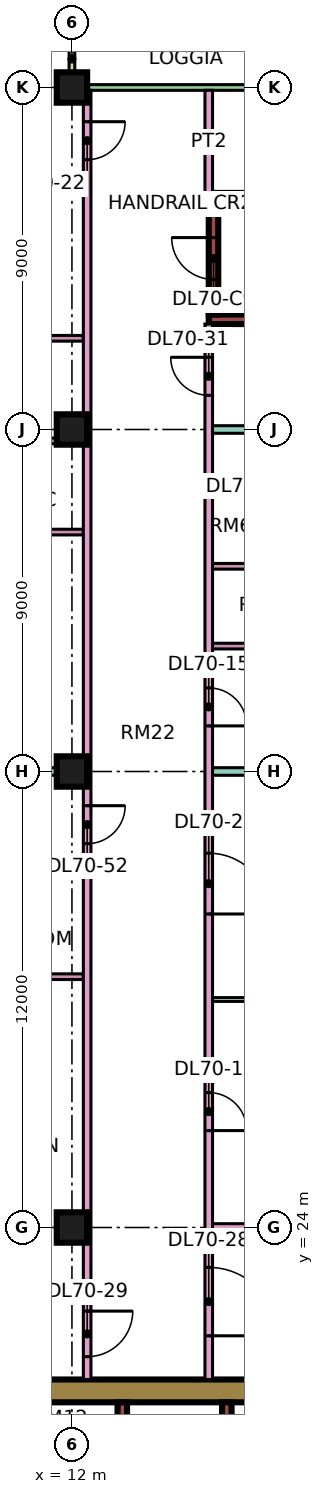
"""IFC4 building model, lengths in metres.
Left out: names, types, materials, properties, quantities, classifications, styles, units other than length and angle.
Written with IfcOpenShell. Run it as: python <this file> out.ifc"""

import sys

from ifc_helpers import new_model, si_unit, direction, frame, frame_2d, origin, origin_2d, place, context, subcontext, project, spatial, rectangle, extrude, element, fill, save


model = new_model("IFC4")
c1 = context("Model", 3, precision=1e-05, world=origin(), true_north=direction((0.0, 1.0)))
c2 = subcontext(c1, "Body", "Model", "MODEL_VIEW")
j1 = project(units=[si_unit("LENGTHUNIT", "METRE"), si_unit("PLANEANGLEUNIT", "RADIAN")], contexts=[c1])
p1 = place(None, origin())
s1 = spatial("IfcSite", under=j1, at=p1, CompositionType="ELEMENT")
p2 = place(p1, origin())
s2 = spatial("IfcBuilding", under=s1, at=p2, CompositionType="ELEMENT")
p3 = place(p2, frame((0.0, 0.0, 299.65)))
s3 = spatial("IfcBuildingStorey", under=s2, at=p3, CompositionType="ELEMENT", Elevation=299.65)
for number, where, z_axis, x_axis in (
    (1, (12.0, 24.0, 0.0), (0.0, 0.0, 1.0), (1.0, 0.0, 0.0)),
    (2, (12.0, 36.0, 0.0), (0.0, 0.0, 1.0), (1.0, 0.0, 0.0)),
    (3, (12.0, 45.0, 0.0), (0.0, 0.0, 1.0), (1.0, 0.0, 0.0)),
    (4, (12.0, 54.0, 0.0), (0.0, 0.0, 1.0), (1.0, 0.0, 0.0)),
):
    element("IfcColumn", number, at=place(p3, frame(where, z_axis=z_axis, x_axis=x_axis)), inside=s3, PredefinedType="COLUMN", context=c2, shape_type="SweptSolid", body=[
        extrude(rectangle(XDim=0.8, YDim=0.8, at=origin_2d()), origin(), (0.0, 0.0, 1.0), 3.75),
    ])
p4 = place(p3, frame((9.0, 19.7, 0.0), z_axis=(0.0, 0.0, 1.0), x_axis=(1.0, 0.0, 0.0)))
e5 = element("IfcWall", 5, at=p4, inside=s3, PredefinedType="SHEAR", context=c2, shape_type="SweptSolid", body=[
    extrude(rectangle(XDim=25.0, YDim=0.6, at=frame_2d((12.5, 0.0))), origin(), (0.0, 0.0, 1.0), 3.75),
])
p5 = place(p4, frame((19.1, 0.0, 0.0)))
e6 = element("IfcOpeningElement", 6, at=p5, cuts=e5, PredefinedType="OPENING", context=c2, shape_type="SweptSolid", body=[
    extrude(rectangle(XDim=1.8, YDim=2.4, at=frame_2d((0.9, 1.2))), frame((0.0, 0.31, 0.0), z_axis=(0.0, -1.0, 0.0), x_axis=(1.0, 0.0, 0.0)), (0.0, 0.0, 1.0), 0.62),
])
p6 = place(p3, frame((13.325, 7.6, 0.0), z_axis=(0.0, 0.0, 1.0), x_axis=(0.0, 1.0, 0.0)))
e7 = element("IfcWall", 7, at=p6, inside=s3, PredefinedType="SHEAR", context=c2, shape_type="SweptSolid", body=[
    extrude(rectangle(XDim=11.8, YDim=0.25, at=frame_2d((5.9, 0.0))), origin(), (0.0, 0.0, 1.0), 3.75),
])
p7 = place(p3, frame((16.075, 15.8, 0.0), z_axis=(0.0, 0.0, 1.0), x_axis=(0.0, 1.0, 0.0)))
e8 = element("IfcWall", 8, at=p7, inside=s3, PredefinedType="SHEAR", context=c2, shape_type="SweptSolid", body=[
    extrude(rectangle(XDim=3.6, YDim=0.25, at=frame_2d((1.8, 0.0))), origin(), (0.0, 0.0, 1.0), 3.75),
])
for number, where, z_axis, x_axis in (
    (9, (15.6, 47.9, 0.0), (0.0, 0.0, 1.0), (1.0, 0.0, 0.0)),
    (10, (15.6, 51.1, 0.0), (0.0, 0.0, 1.0), (1.0, 0.0, 0.0)),
):
    element("IfcWall", number, at=place(p3, frame(where, z_axis=z_axis, x_axis=x_axis)), inside=s3, PredefinedType="SHEAR", context=c2, shape_type="SweptSolid", body=[
        extrude(rectangle(XDim=7.0, YDim=0.25, at=frame_2d((3.5, 0.0))), origin(), (0.0, 0.0, 1.0), 3.75),
    ])
p8 = place(p3, frame((15.725, 48.025, 0.0), z_axis=(0.0, 0.0, 1.0), x_axis=(0.0, 1.0, 0.0)))
e11 = element("IfcWall", 11, at=p8, inside=s3, PredefinedType="SHEAR", context=c2, shape_type="SweptSolid", body=[
    extrude(rectangle(XDim=2.95, YDim=0.25, at=frame_2d((1.475, 0.0))), origin(), (0.0, 0.0, 1.0), 3.75),
])
p9 = place(p8, frame((0.925, 0.0, 0.0)))
e12 = element("IfcOpeningElement", 12, at=p9, cuts=e11, PredefinedType="OPENING", context=c2, shape_type="SweptSolid", body=[
    extrude(rectangle(XDim=1.1, YDim=2.2, at=frame_2d((0.55, 1.1))), frame((0.0, 0.135, 0.0), z_axis=(0.0, -1.0, 0.0), x_axis=(1.0, 0.0, 0.0)), (0.0, 0.0, 1.0), 0.27),
])
p10 = place(p3, frame((22.425, 54.0, 0.0), z_axis=(0.0, 0.0, 1.0), x_axis=(-1.0, 0.0, 0.0)))
e13 = element("IfcWall", 13, at=p10, inside=s3, PredefinedType="SOLIDWALL", context=c2, shape_type="SweptSolid", body=[
    extrude(rectangle(XDim=10.35, YDim=0.15, at=frame_2d((5.175, 0.0))), origin(), (0.0, 0.0, 1.0), 3.35),
])
p11 = place(p10, frame((1.012, 0.0, 0.45)))
e14 = element("IfcOpeningElement", 14, at=p11, cuts=e13, PredefinedType="OPENING", context=c2, shape_type="SweptSolid", body=[
    extrude(rectangle(XDim=4.8, YDim=2.4, at=frame_2d((2.4, 1.2))), frame((0.0, 0.085, 0.0), z_axis=(0.0, -1.0, 0.0), x_axis=(1.0, 0.0, 0.0)), (0.0, 0.0, 1.0), 0.17),
])
p12 = place(p3, frame((12.0, 55.5, 0.0), z_axis=(0.0, 0.0, 1.0), x_axis=(0.0, -1.0, 0.0)))
e15 = element("IfcWall", 15, at=p12, inside=s3, PredefinedType="SOLIDWALL", context=c2, shape_type="SweptSolid", body=[
    extrude(rectangle(XDim=1.5, YDim=0.15, at=frame_2d((0.75, 0.0))), origin(), (0.0, 0.0, 1.0), 3.35),
])
p13 = place(p3, frame((0.0, 36.0, 0.0), z_axis=(0.0, 0.0, 1.0), x_axis=(1.0, 0.0, 0.0)))
e16 = element("IfcWall", 16, at=p13, inside=s3, PredefinedType="PARTITIONING", context=c2, shape_type="SweptSolid", body=[
    extrude(rectangle(XDim=12.3, YDim=0.2, at=frame_2d((6.15, 0.0))), origin(), (0.0, 0.0, 1.0), 3.35),
])
p14 = place(p3, frame((0.074, 22.4, 0.0), z_axis=(0.0, 0.0, 1.0), x_axis=(1.0, 0.0, 0.0)))
e17 = element("IfcWall", 17, at=p14, inside=s3, PredefinedType="PARTITIONING", context=c2, shape_type="SweptSolid", body=[
    extrude(rectangle(XDim=12.226, YDim=0.2, at=frame_2d((6.113, 0.0))), origin(), (0.0, 0.0, 1.0), 3.35),
])
for number, where, z_axis, x_axis in (
    (18, (7.675, 42.3, 0.0), (0.0, 0.0, 1.0), (1.0, 0.0, 0.0)),
    (19, (7.675, 44.7, 0.0), (0.0, 0.0, 1.0), (1.0, 0.0, 0.0)),
    (20, (7.675, 47.4, 0.0), (0.0, 0.0, 1.0), (1.0, 0.0, 0.0)),
    (21, (7.675, 51.3, 0.0), (0.0, 0.0, 1.0), (1.0, 0.0, 0.0)),
):
    element("IfcWall", number, at=place(p3, frame(where, z_axis=z_axis, x_axis=x_axis)), inside=s3, PredefinedType="PARTITIONING", context=c2, shape_type="SweptSolid", body=[
        extrude(rectangle(XDim=4.625, YDim=0.15, at=frame_2d((2.312, 0.0))), origin(), (0.0, 0.0, 1.0), 3.35),
    ])
for number, where, z_axis, x_axis in (
    (22, (8.275, 30.6, 0.0), (0.0, 0.0, 1.0), (1.0, 0.0, 0.0)),
    (23, (8.275, 33.3, 0.0), (0.0, 0.0, 1.0), (1.0, 0.0, 0.0)),
):
    element("IfcWall", number, at=place(p3, frame(where, z_axis=z_axis, x_axis=x_axis)), inside=s3, PredefinedType="PARTITIONING", context=c2, shape_type="SweptSolid", body=[
        extrude(rectangle(XDim=4.025, YDim=0.15, at=frame_2d((2.013, 0.0))), origin(), (0.0, 0.0, 1.0), 3.35),
    ])
p15 = place(p3, frame((12.4, 20.0, 0.0), z_axis=(0.0, 0.0, 1.0), x_axis=(0.0, 1.0, 0.0)))
e24 = element("IfcWall", 24, at=p15, inside=s3, PredefinedType="PARTITIONING", context=c2, shape_type="SweptSolid", body=[
    extrude(rectangle(XDim=33.926, YDim=0.2, at=frame_2d((16.963, 0.0))), origin(), (0.0, 0.0, 1.0), 3.35),
])
p16 = place(p15, frame((32.1, 0.0, 0.0)))
e25 = element("IfcOpeningElement", 25, at=p16, cuts=e24, PredefinedType="OPENING", context=c2, shape_type="SweptSolid", body=[
    extrude(rectangle(XDim=1.0, YDim=2.1, at=frame_2d((0.5, 1.05))), frame((0.0, 0.11, 0.0), z_axis=(0.0, -1.0, 0.0), x_axis=(1.0, 0.0, 0.0)), (0.0, 0.0, 1.0), 0.22),
])
p17 = place(p15, frame((0.6, 0.0, 0.0)))
e26 = element("IfcOpeningElement", 26, at=p17, cuts=e24, PredefinedType="OPENING", context=c2, shape_type="SweptSolid", body=[
    extrude(rectangle(XDim=1.2, YDim=2.1, at=frame_2d((0.6, 1.05))), frame((0.0, 0.11, 0.0), z_axis=(0.0, -1.0, 0.0), x_axis=(1.0, 0.0, 0.0)), (0.0, 0.0, 1.0), 0.22),
])
p18 = place(p15, frame((14.1, 0.0, 0.0)))
e27 = element("IfcOpeningElement", 27, at=p18, cuts=e24, PredefinedType="OPENING", context=c2, shape_type="SweptSolid", body=[
    extrude(rectangle(XDim=1.0, YDim=2.1, at=frame_2d((0.5, 1.05))), frame((0.0, 0.11, 0.0), z_axis=(0.0, -1.0, 0.0), x_axis=(1.0, 0.0, 0.0)), (0.0, 0.0, 1.0), 0.22),
])
p19 = place(p3, frame((15.6, 20.0, 0.0), z_axis=(0.0, 0.0, 1.0), x_axis=(0.0, 1.0, 0.0)))
e28 = element("IfcWall", 28, at=p19, inside=s3, PredefinedType="PARTITIONING", context=c2, shape_type="SweptSolid", body=[
    extrude(rectangle(XDim=27.775, YDim=0.2, at=frame_2d((13.887, 0.0))), origin(), (0.0, 0.0, 1.0), 3.35),
])
p20 = place(p19, frame((6.55, 0.0, 0.0)))
e29 = element("IfcOpeningElement", 29, at=p20, cuts=e28, PredefinedType="OPENING", context=c2, shape_type="SweptSolid", body=[
    extrude(rectangle(XDim=1.0, YDim=2.1, at=frame_2d((0.5, 1.05))), frame((0.0, 0.11, 0.0), z_axis=(0.0, -1.0, 0.0), x_axis=(1.0, 0.0, 0.0)), (0.0, 0.0, 1.0), 0.22),
])
p21 = place(p19, frame((12.25, 0.0, 0.0)))
e30 = element("IfcOpeningElement", 30, at=p21, cuts=e28, PredefinedType="OPENING", context=c2, shape_type="SweptSolid", body=[
    extrude(rectangle(XDim=1.6, YDim=2.1, at=frame_2d((0.8, 1.05))), frame((0.0, 0.11, 0.0), z_axis=(0.0, -1.0, 0.0), x_axis=(1.0, 0.0, 0.0)), (0.0, 0.0, 1.0), 0.22),
])
p22 = place(p19, frame((17.2, 0.0, 0.0)))
e31 = element("IfcOpeningElement", 31, at=p22, cuts=e28, PredefinedType="OPENING", context=c2, shape_type="SweptSolid", body=[
    extrude(rectangle(XDim=1.0, YDim=2.1, at=frame_2d((0.5, 1.05))), frame((0.0, 0.11, 0.0), z_axis=(0.0, -1.0, 0.0), x_axis=(1.0, 0.0, 0.0)), (0.0, 0.0, 1.0), 0.22),
])
p23 = place(p19, frame((1.15, 0.0, 0.0)))
e32 = element("IfcOpeningElement", 32, at=p23, cuts=e28, PredefinedType="OPENING", context=c2, shape_type="SweptSolid", body=[
    extrude(rectangle(XDim=1.8, YDim=2.1, at=frame_2d((0.9, 1.05))), frame((0.0, 0.11, 0.0), z_axis=(0.0, -1.0, 0.0), x_axis=(1.0, 0.0, 0.0)), (0.0, 0.0, 1.0), 0.22),
])
p24 = place(p19, frame((25.9, 0.0, 0.0)))
e33 = element("IfcOpeningElement", 33, at=p24, cuts=e28, PredefinedType="OPENING", context=c2, shape_type="SweptSolid", body=[
    extrude(rectangle(XDim=1.0, YDim=2.1, at=frame_2d((0.5, 1.05))), frame((0.0, 0.11, 0.0), z_axis=(0.0, -1.0, 0.0), x_axis=(1.0, 0.0, 0.0)), (0.0, 0.0, 1.0), 0.22),
])
p25 = place(p3, frame((15.6, 51.225, 0.0), z_axis=(0.0, 0.0, 1.0), x_axis=(0.0, 1.0, 0.0)))
e34 = element("IfcWall", 34, at=p25, inside=s3, PredefinedType="PARTITIONING", context=c2, shape_type="SweptSolid", body=[
    extrude(rectangle(XDim=2.701, YDim=0.2, at=frame_2d((1.351, 0.0))), origin(), (0.0, 0.0, 1.0), 3.35),
])
p26 = place(p3, frame((15.7, 24.0, 0.0), z_axis=(0.0, 0.0, 1.0), x_axis=(1.0, 0.0, 0.0)))
e35 = element("IfcWall", 35, at=p26, inside=s3, PredefinedType="PARTITIONING", context=c2, shape_type="SweptSolid", body=[
    extrude(rectangle(XDim=5.8, YDim=0.2, at=frame_2d((2.9, 0.0))), origin(), (0.0, 0.0, 1.0), 3.35),
])
p27 = place(p3, frame((15.7, 30.0, 0.0), z_axis=(0.0, 0.0, 1.0), x_axis=(1.0, 0.0, 0.0)))
e36 = element("IfcWall", 36, at=p27, inside=s3, PredefinedType="PARTITIONING", context=c2, shape_type="SweptSolid", body=[
    extrude(rectangle(XDim=5.8, YDim=0.1, at=frame_2d((2.9, 0.0))), origin(), (0.0, 0.0, 1.0), 3.35),
])
p28 = place(p3, frame((15.7, 36.0, 0.0), z_axis=(0.0, 0.0, 1.0), x_axis=(1.0, 0.0, 0.0)))
e37 = element("IfcWall", 37, at=p28, inside=s3, PredefinedType="PARTITIONING", context=c2, shape_type="SweptSolid", body=[
    extrude(rectangle(XDim=8.3, YDim=0.2, at=frame_2d((4.15, 0.0))), origin(), (0.0, 0.0, 1.0), 3.35),
])
for number, where, z_axis, x_axis in (
    (38, (15.7, 39.3, 0.0), (0.0, 0.0, 1.0), (1.0, 0.0, 0.0)),
    (39, (15.7, 41.4, 0.0), (0.0, 0.0, 1.0), (1.0, 0.0, 0.0)),
):
    element("IfcWall", number, at=place(p3, frame(where, z_axis=z_axis, x_axis=x_axis)), inside=s3, PredefinedType="PARTITIONING", context=c2, shape_type="SweptSolid", body=[
        extrude(rectangle(XDim=2.525, YDim=0.15, at=frame_2d((1.263, 0.0))), origin(), (0.0, 0.0, 1.0), 3.35),
    ])
p29 = place(p3, frame((15.7, 45.0, 0.0), z_axis=(0.0, 0.0, 1.0), x_axis=(1.0, 0.0, 0.0)))
e40 = element("IfcWall", 40, at=p29, inside=s3, PredefinedType="PARTITIONING", context=c2, shape_type="SweptSolid", body=[
    extrude(rectangle(XDim=8.226, YDim=0.2, at=frame_2d((4.113, 0.0))), origin(), (0.0, 0.0, 1.0), 3.35),
])
p30 = place(p9, frame((1.1, 0.0, 0.0), z_axis=(0.0, 0.0, 1.0), x_axis=(-1.0, 0.0, 0.0)))
e41 = element("IfcDoor", 41, at=p30, inside=s3, OperationType="SINGLE_SWING_RIGHT", PredefinedType="DOOR", context=c2, shape_type="SweptSolid", body=[
    extrude(rectangle(XDim=1.1, YDim=2.2, at=frame_2d((0.55, 1.1))), frame((0.0, 0.025, 0.0), z_axis=(0.0, -1.0, 0.0), x_axis=(1.0, 0.0, 0.0)), (0.0, 0.0, 1.0), 0.05),
])
fill(e12, e41)
p31 = place(p20, frame((1.0, 0.0, 0.0), z_axis=(0.0, 0.0, 1.0), x_axis=(-1.0, 0.0, 0.0)))
e42 = element("IfcDoor", 42, at=p31, inside=s3, OperationType="SINGLE_SWING_LEFT", PredefinedType="DOOR", context=c2, shape_type="SweptSolid", body=[
    extrude(rectangle(XDim=1.0, YDim=2.1, at=frame_2d((0.5, 1.05))), frame((0.0, 0.025, 0.0), z_axis=(0.0, -1.0, 0.0), x_axis=(1.0, 0.0, 0.0)), (0.0, 0.0, 1.0), 0.05),
])
fill(e29, e42)
p32 = place(p21, frame((1.6, 0.0, 0.0), z_axis=(0.0, 0.0, 1.0), x_axis=(-1.0, 0.0, 0.0)))
e43 = element("IfcDoor", 43, at=p32, inside=s3, OperationType="DOUBLE_DOOR_SINGLE_SWING", PredefinedType="DOOR", context=c2, shape_type="SweptSolid", body=[
    extrude(rectangle(XDim=1.6, YDim=2.1, at=frame_2d((0.8, 1.05))), frame((0.0, 0.025, 0.0), z_axis=(0.0, -1.0, 0.0), x_axis=(1.0, 0.0, 0.0)), (0.0, 0.0, 1.0), 0.05),
])
fill(e30, e43)
p33 = place(p22, frame((1.0, 0.0, 0.0), z_axis=(0.0, 0.0, 1.0), x_axis=(-1.0, 0.0, 0.0)))
e44 = element("IfcDoor", 44, at=p33, inside=s3, OperationType="SINGLE_SWING_LEFT", PredefinedType="DOOR", context=c2, shape_type="SweptSolid", body=[
    extrude(rectangle(XDim=1.0, YDim=2.1, at=frame_2d((0.5, 1.05))), frame((0.0, 0.025, 0.0), z_axis=(0.0, -1.0, 0.0), x_axis=(1.0, 0.0, 0.0)), (0.0, 0.0, 1.0), 0.05),
])
fill(e31, e44)
p34 = place(p16, origin())
e45 = element("IfcDoor", 45, at=p34, inside=s3, OperationType="SINGLE_SWING_RIGHT", PredefinedType="DOOR", context=c2, shape_type="SweptSolid", body=[
    extrude(rectangle(XDim=1.0, YDim=2.1, at=frame_2d((0.5, 1.05))), frame((0.0, 0.025, 0.0), z_axis=(0.0, -1.0, 0.0), x_axis=(1.0, 0.0, 0.0)), (0.0, 0.0, 1.0), 0.05),
])
fill(e25, e45)
p35 = place(p23, frame((1.8, 0.0, 0.0), z_axis=(0.0, 0.0, 1.0), x_axis=(-1.0, 0.0, 0.0)))
e46 = element("IfcDoor", 46, at=p35, inside=s3, OperationType="DOUBLE_DOOR_SINGLE_SWING", PredefinedType="DOOR", context=c2, shape_type="SweptSolid", body=[
    extrude(rectangle(XDim=1.8, YDim=2.1, at=frame_2d((0.9, 1.05))), frame((0.0, 0.025, 0.0), z_axis=(0.0, -1.0, 0.0), x_axis=(1.0, 0.0, 0.0)), (0.0, 0.0, 1.0), 0.05),
])
fill(e32, e46)
p36 = place(p17, origin())
e47 = element("IfcDoor", 47, at=p36, inside=s3, OperationType="SINGLE_SWING_RIGHT", PredefinedType="DOOR", context=c2, shape_type="SweptSolid", body=[
    extrude(rectangle(XDim=1.2, YDim=2.1, at=frame_2d((0.6, 1.05))), frame((0.0, 0.025, 0.0), z_axis=(0.0, -1.0, 0.0), x_axis=(1.0, 0.0, 0.0)), (0.0, 0.0, 1.0), 0.05),
])
fill(e26, e47)
p37 = place(p24, frame((1.0, 0.0, 0.0), z_axis=(0.0, 0.0, 1.0), x_axis=(-1.0, 0.0, 0.0)))
e48 = element("IfcDoor", 48, at=p37, inside=s3, OperationType="SINGLE_SWING_RIGHT", PredefinedType="DOOR", context=c2, shape_type="SweptSolid", body=[
    extrude(rectangle(XDim=1.0, YDim=2.1, at=frame_2d((0.5, 1.05))), frame((0.0, 0.025, 0.0), z_axis=(0.0, -1.0, 0.0), x_axis=(1.0, 0.0, 0.0)), (0.0, 0.0, 1.0), 0.05),
])
fill(e33, e48)
p38 = place(p18, origin())
e49 = element("IfcDoor", 49, at=p38, inside=s3, OperationType="SINGLE_SWING_RIGHT", PredefinedType="DOOR", context=c2, shape_type="SweptSolid", body=[
    extrude(rectangle(XDim=1.0, YDim=2.1, at=frame_2d((0.5, 1.05))), frame((0.0, 0.025, 0.0), z_axis=(0.0, -1.0, 0.0), x_axis=(1.0, 0.0, 0.0)), (0.0, 0.0, 1.0), 0.05),
])
fill(e27, e49)
save(model, sys.argv[1])
